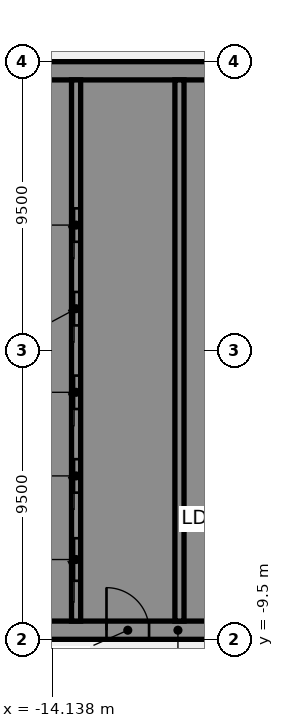
"""IFC4 building model, lengths in metres.
Left out: names, types, materials, properties, quantities, classifications, styles, units other than length and angle.
Written with IfcOpenShell. Run it as: python <this file> out.ifc"""

import sys

from ifc_helpers import new_model, si_unit, direction, frame, frame_2d, origin, place, context, subcontext, project, spatial, polyline, rectangle, outline, extrude, element, fill, save


model = new_model("IFC4")
c1 = context("Model", 3, precision=1e-05, world=origin(), true_north=direction((0.0, 1.0)))
c2 = subcontext(c1, "Body", "Model", "MODEL_VIEW")
j1 = project(units=[si_unit("LENGTHUNIT", "METRE"), si_unit("PLANEANGLEUNIT", "RADIAN")], contexts=[c1])
p1 = place(None, origin())
s1 = spatial("IfcSite", under=j1, at=p1, CompositionType="ELEMENT")
p2 = place(p1, origin())
s2 = spatial("IfcBuilding", under=s1, at=p2, CompositionType="ELEMENT")
p3 = place(p2, frame((0.0, 0.0, 124.75)))
s3 = spatial("IfcBuildingStorey", under=s2, at=p3, CompositionType="ELEMENT", Elevation=124.75)
p4 = place(p3, frame((-16.5, -9.2, 0.0), z_axis=(0.0, 0.0, 1.0), x_axis=(1.0, 0.0, 0.0)))
e1 = element("IfcWall", 1, at=p4, inside=s3, PredefinedType="SHEAR", context=c2, shape_type="SweptSolid", body=[
    extrude(rectangle(XDim=13.0, YDim=0.6, at=frame_2d((6.5, 0.0))), origin(), (0.0, 0.0, 1.0), 3.57),
])
p5 = place(p4, frame((4.15, 0.0, 0.0)))
e2 = element("IfcOpeningElement", 2, at=p5, cuts=e1, PredefinedType="OPENING", context=c2, shape_type="SweptSolid", body=[
    extrude(rectangle(XDim=1.4, YDim=2.1, at=frame_2d((0.7, 1.05))), frame((0.0, 0.31, 0.0), z_axis=(0.0, -1.0, 0.0), x_axis=(1.0, 0.0, 0.0)), (0.0, 0.0, 1.0), 0.62),
])
p6 = place(p4, frame((10.125, 0.0, 0.0)))
e3 = element("IfcOpeningElement", 3, at=p6, cuts=e1, PredefinedType="OPENING", context=c2, shape_type="SweptSolid", body=[
    extrude(rectangle(XDim=1.4, YDim=2.1, at=frame_2d((0.7, 1.05))), frame((0.0, 0.31, 0.0), z_axis=(0.0, -1.0, 0.0), x_axis=(1.0, 0.0, 0.0)), (0.0, 0.0, 1.0), 0.62),
])
p7 = place(p3, origin())
e4 = element("IfcWall", 4, at=p7, inside=s3, PredefinedType="SHEAR", context=c2, shape_type="SweptSolid", body=[
    extrude(outline(polyline([(-13.5, -8.9), (-13.5, -8.125), (-15.9, -8.125), (-15.9, -5.625), (-13.5, -5.625), (-13.5, -5.375), (-15.9, -5.375), (-15.9, -2.875), (-13.5, -2.875), (-13.5, -2.625), (-15.9, -2.625), (-15.9, -0.125), (-13.5, -0.125), (-13.5, 0.125), (-15.9, 0.125), (-15.9, 2.625), (-13.5, 2.625), (-13.5, 2.875), (-15.9, 2.875), (-15.9, 5.375), (-13.5, 5.375), (-13.5, 5.625), (-15.9, 5.625), (-15.9, 8.125), (-13.5, 8.125), (-13.5, 8.9), (-15.9, 8.9), (-16.5, 8.9), (-16.5, -8.9), (-15.9, -8.9), (-13.5, -8.9)])), origin(), (0.0, 0.0, 1.0), 3.57),
])
p8 = place(p3, frame((-16.5, 9.2, 0.0), z_axis=(0.0, 0.0, 1.0), x_axis=(1.0, 0.0, 0.0)))
e5 = element("IfcWall", 5, at=p8, inside=s3, PredefinedType="SHEAR", context=c2, shape_type="SweptSolid", body=[
    extrude(rectangle(XDim=13.0, YDim=0.6, at=frame_2d((6.5, 0.0))), origin(), (0.0, 0.0, 1.0), 3.57),
])
p9 = place(p3, origin())
e6 = element("IfcWall", 6, at=p9, inside=s3, PredefinedType="SHEAR", context=c2, shape_type="SweptSolid", body=[
    extrude(outline(polyline([(-9.8, -5.375), (-9.8, -5.625), (-7.5, -5.625), (-7.2, -5.625), (-7.2, 8.9), (-7.5, 8.9), (-9.8, 8.9), (-9.8, 8.125), (-7.5, 8.125), (-7.5, 5.625), (-9.8, 5.625), (-9.8, 5.375), (-7.5, 5.375), (-7.5, 2.875), (-9.8, 2.875), (-9.8, 2.625), (-7.5, 2.625), (-7.5, 0.125), (-9.8, 0.125), (-9.8, -0.125), (-7.5, -0.125), (-7.5, -2.625), (-9.8, -2.625), (-9.8, -2.875), (-7.5, -2.875), (-7.5, -5.375), (-9.8, -5.375)])), origin(), (0.0, 0.0, 1.0), 3.57),
])
p10 = place(p3, origin())
e7 = element("IfcWall", 7, at=p10, inside=s3, PredefinedType="SHEAR", context=c2, shape_type="SweptSolid", body=[
    extrude(outline(polyline([(-7.5, -8.125), (-9.55, -8.125), (-9.55, -5.625), (-9.8, -5.625), (-9.8, -8.125), (-9.8, -8.9), (-7.5, -8.9), (-7.5, -8.125)])), origin(), (0.0, 0.0, 1.0), 3.57),
])
p11 = place(p3, frame((-13.35, -8.9, 0.0), z_axis=(0.0, 0.0, 1.0), x_axis=(0.0, 1.0, 0.0)))
e8 = element("IfcWall", 8, at=p11, inside=s3, PredefinedType="SHEAR", context=c2, shape_type="SweptSolid", body=[
    extrude(rectangle(XDim=17.8, YDim=0.3, at=frame_2d((8.9, 0.0))), origin(), (0.0, 0.0, 1.0), 3.57),
])
p12 = place(p11, frame((1.325, 0.0, 0.0)))
e9 = element("IfcOpeningElement", 9, at=p12, cuts=e8, PredefinedType="OPENING", context=c2, shape_type="SweptSolid", body=[
    extrude(rectangle(XDim=1.4, YDim=2.1, at=frame_2d((0.7, 1.05))), frame((0.0, 0.16, 0.0), z_axis=(0.0, -1.0, 0.0), x_axis=(1.0, 0.0, 0.0)), (0.0, 0.0, 1.0), 0.32),
])
p13 = place(p11, frame((4.225, 0.0, 0.0)))
e10 = element("IfcOpeningElement", 10, at=p13, cuts=e8, PredefinedType="OPENING", context=c2, shape_type="SweptSolid", body=[
    extrude(rectangle(XDim=1.1, YDim=2.1, at=frame_2d((0.55, 1.05))), frame((0.0, 0.16, 0.0), z_axis=(0.0, -1.0, 0.0), x_axis=(1.0, 0.0, 0.0)), (0.0, 0.0, 1.0), 0.32),
])
p14 = place(p11, frame((6.975, 0.0, 0.0)))
e11 = element("IfcOpeningElement", 11, at=p14, cuts=e8, PredefinedType="OPENING", context=c2, shape_type="SweptSolid", body=[
    extrude(rectangle(XDim=1.1, YDim=2.1, at=frame_2d((0.55, 1.05))), frame((0.0, 0.16, 0.0), z_axis=(0.0, -1.0, 0.0), x_axis=(1.0, 0.0, 0.0)), (0.0, 0.0, 1.0), 0.32),
])
p15 = place(p11, frame((9.725, 0.0, 0.0)))
e12 = element("IfcOpeningElement", 12, at=p15, cuts=e8, PredefinedType="OPENING", context=c2, shape_type="SweptSolid", body=[
    extrude(rectangle(XDim=1.1, YDim=2.1, at=frame_2d((0.55, 1.05))), frame((0.0, 0.16, 0.0), z_axis=(0.0, -1.0, 0.0), x_axis=(1.0, 0.0, 0.0)), (0.0, 0.0, 1.0), 0.32),
])
p16 = place(p11, frame((12.475, 0.0, 0.0)))
e13 = element("IfcOpeningElement", 13, at=p16, cuts=e8, PredefinedType="OPENING", context=c2, shape_type="SweptSolid", body=[
    extrude(rectangle(XDim=1.1, YDim=2.1, at=frame_2d((0.55, 1.05))), frame((0.0, 0.16, 0.0), z_axis=(0.0, -1.0, 0.0), x_axis=(1.0, 0.0, 0.0)), (0.0, 0.0, 1.0), 0.32),
])
p17 = place(p3, frame((-9.95, -8.9, 0.0), z_axis=(0.0, 0.0, 1.0), x_axis=(0.0, 1.0, 0.0)))
e14 = element("IfcWall", 14, at=p17, inside=s3, PredefinedType="SHEAR", context=c2, shape_type="SweptSolid", body=[
    extrude(rectangle(XDim=17.8, YDim=0.3, at=frame_2d((8.9, 0.0))), origin(), (0.0, 0.0, 1.0), 3.57),
])
p18 = place(p5, origin())
e15 = element("IfcDoor", 15, at=p18, inside=s3, OperationType="SINGLE_SWING_LEFT", PredefinedType="DOOR", context=c2, shape_type="SweptSolid", body=[
    extrude(rectangle(XDim=1.4, YDim=2.1, at=frame_2d((0.7, 1.05))), frame((0.0, 0.025, 0.0), z_axis=(0.0, -1.0, 0.0), x_axis=(1.0, 0.0, 0.0)), (0.0, 0.0, 1.0), 0.05),
])
fill(e2, e15)
p19 = place(p12, origin())
e16 = element("IfcDoor", 16, at=p19, inside=s3, OperationType="SLIDING_TO_LEFT", PredefinedType="DOOR", context=c2, shape_type="SweptSolid", body=[
    extrude(rectangle(XDim=1.4, YDim=2.1, at=frame_2d((0.7, 1.05))), frame((0.0, 0.025, 0.0), z_axis=(0.0, -1.0, 0.0), x_axis=(1.0, 0.0, 0.0)), (0.0, 0.0, 1.0), 0.05),
])
fill(e9, e16)
p20 = place(p13, origin())
e17 = element("IfcDoor", 17, at=p20, inside=s3, OperationType="SLIDING_TO_LEFT", PredefinedType="DOOR", context=c2, shape_type="SweptSolid", body=[
    extrude(rectangle(XDim=1.1, YDim=2.1, at=frame_2d((0.55, 1.05))), frame((0.0, 0.025, 0.0), z_axis=(0.0, -1.0, 0.0), x_axis=(1.0, 0.0, 0.0)), (0.0, 0.0, 1.0), 0.05),
])
fill(e10, e17)
p21 = place(p14, origin())
e18 = element("IfcDoor", 18, at=p21, inside=s3, OperationType="SLIDING_TO_LEFT", PredefinedType="DOOR", context=c2, shape_type="SweptSolid", body=[
    extrude(rectangle(XDim=1.1, YDim=2.1, at=frame_2d((0.55, 1.05))), frame((0.0, 0.025, 0.0), z_axis=(0.0, -1.0, 0.0), x_axis=(1.0, 0.0, 0.0)), (0.0, 0.0, 1.0), 0.05),
])
fill(e11, e18)
p22 = place(p15, origin())
e19 = element("IfcDoor", 19, at=p22, inside=s3, OperationType="SLIDING_TO_LEFT", PredefinedType="DOOR", context=c2, shape_type="SweptSolid", body=[
    extrude(rectangle(XDim=1.1, YDim=2.1, at=frame_2d((0.55, 1.05))), frame((0.0, 0.025, 0.0), z_axis=(0.0, -1.0, 0.0), x_axis=(1.0, 0.0, 0.0)), (0.0, 0.0, 1.0), 0.05),
])
fill(e12, e19)
p23 = place(p16, origin())
e20 = element("IfcDoor", 20, at=p23, inside=s3, OperationType="SLIDING_TO_LEFT", PredefinedType="DOOR", context=c2, shape_type="SweptSolid", body=[
    extrude(rectangle(XDim=1.1, YDim=2.1, at=frame_2d((0.55, 1.05))), frame((0.0, 0.025, 0.0), z_axis=(0.0, -1.0, 0.0), x_axis=(1.0, 0.0, 0.0)), (0.0, 0.0, 1.0), 0.05),
])
fill(e13, e20)
save(model, sys.argv[1])
